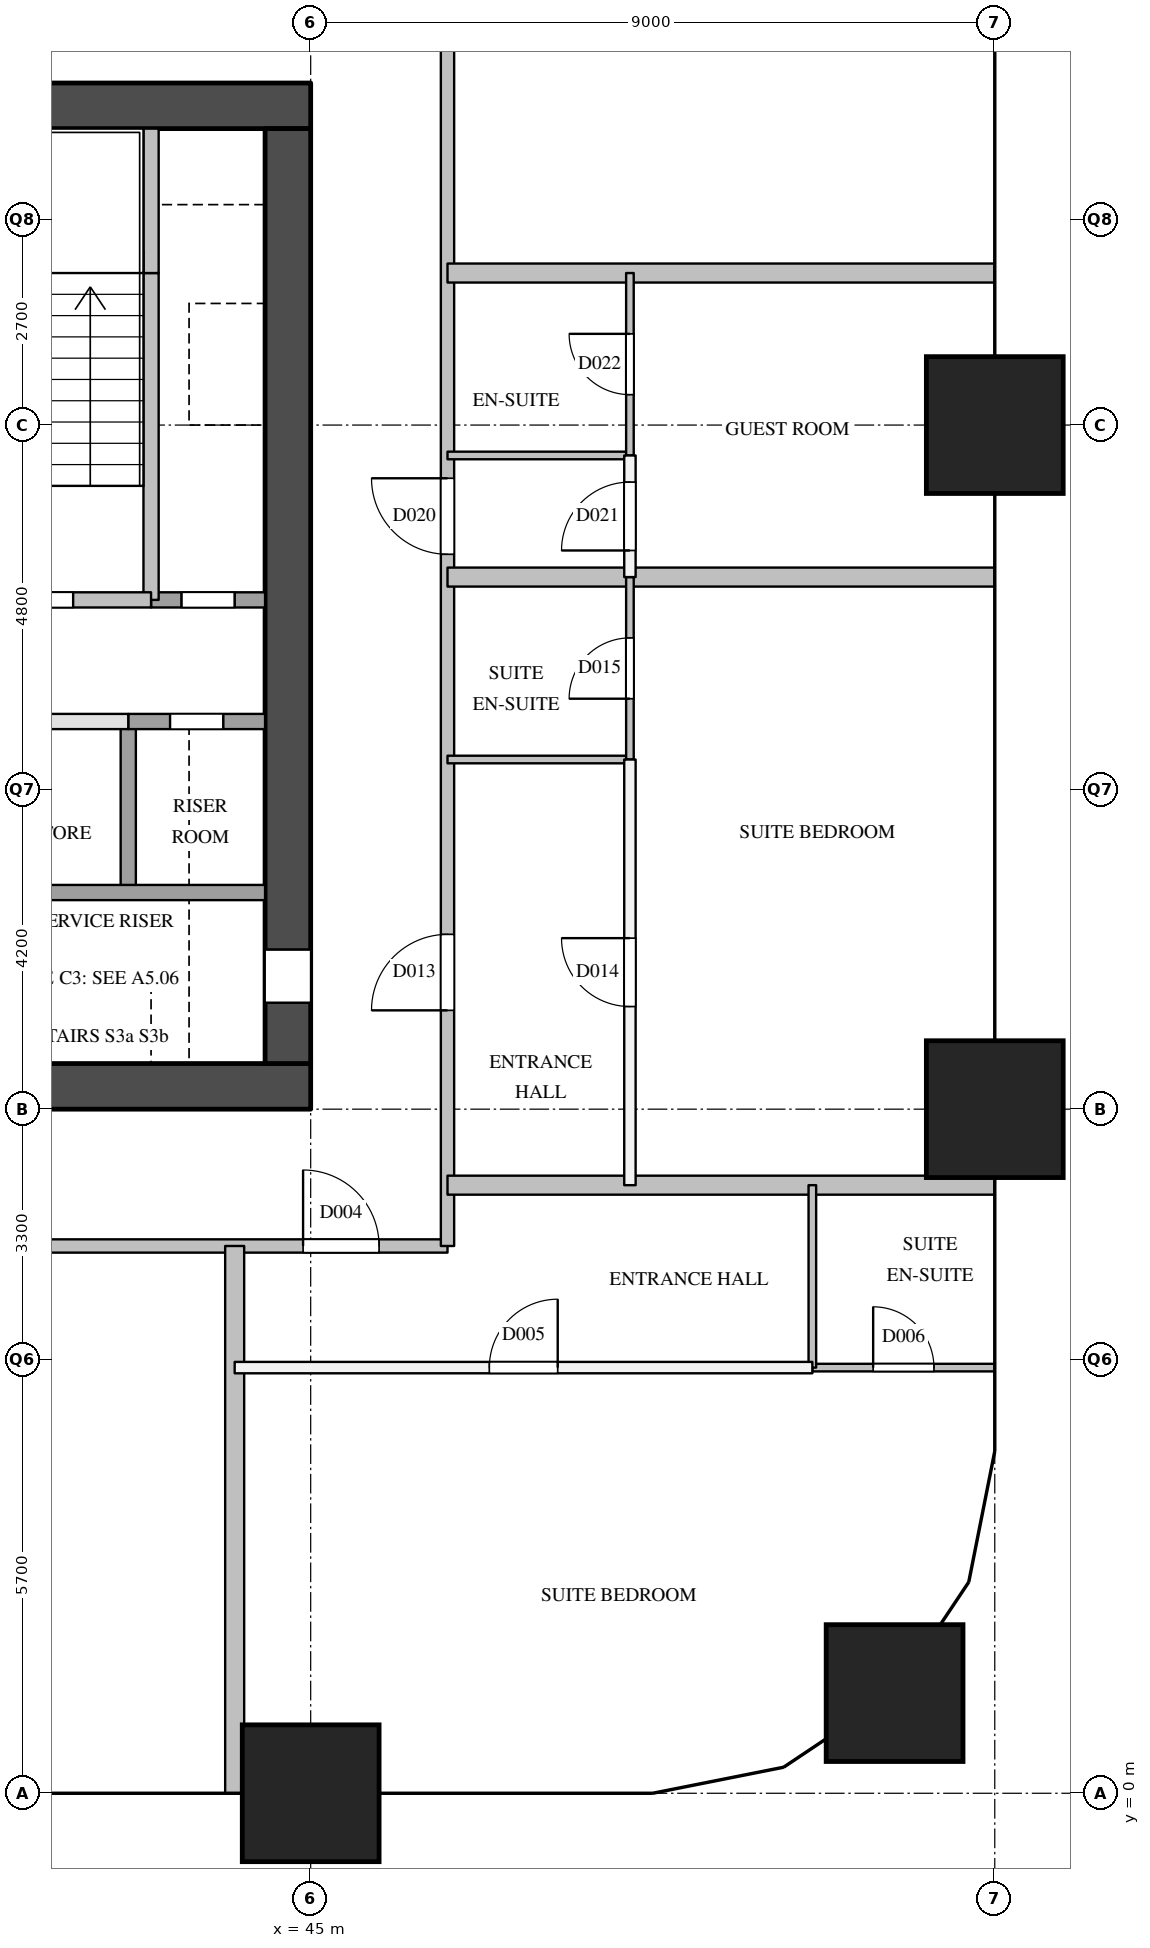
"""IFC4 building model, lengths in metres.
Left out: names, types, materials, properties, quantities, classifications, styles, units other than length and angle.
Written with IfcOpenShell. Run it as: python <this file> out.ifc"""

import sys

from ifc_helpers import new_model, si_unit, direction, frame, frame_2d, origin, origin_2d, place, context, subcontext, project, spatial, rectangle, extrude, element, fill, save


model = new_model("IFC4")
c1 = context("Model", 3, precision=1e-05, world=origin(), true_north=direction((0.0, 1.0)))
c2 = subcontext(c1, "Body", "Model", "MODEL_VIEW")
j1 = project(units=[si_unit("LENGTHUNIT", "METRE"), si_unit("PLANEANGLEUNIT", "RADIAN")], contexts=[c1])
p1 = place(None, origin())
s1 = spatial("IfcSite", under=j1, at=p1, CompositionType="ELEMENT")
p2 = place(p1, origin())
s2 = spatial("IfcBuilding", under=s1, at=p2, CompositionType="ELEMENT")
p3 = place(p2, frame((0.0, 0.0, 34.8)))
s3 = spatial("IfcBuildingStorey", under=s2, at=p3, CompositionType="ELEMENT", Elevation=34.8)
for number, where, z_axis, x_axis in (
    (1, (45.0, 0.0, 0.0), (0.0, 0.0, 1.0), (1.0, 0.0, 0.0)),
    (2, (52.682, 1.318, 0.0), (0.0, 0.0, 1.0), (1.0, 0.0, 0.0)),
    (3, (54.0, 9.0, 0.0), (0.0, 0.0, 1.0), (1.0, 0.0, 0.0)),
    (4, (54.0, 18.0, 0.0), (0.0, 0.0, 1.0), (1.0, 0.0, 0.0)),
):
    element("IfcColumn", number, at=place(p3, frame(where, z_axis=z_axis, x_axis=x_axis)), inside=s3, PredefinedType="COLUMN", context=c2, shape_type="SweptSolid", body=[
        extrude(rectangle(XDim=1.8, YDim=1.8, at=origin_2d()), origin(), (0.0, 0.0, 1.0), 3.8),
    ])
for number, where, z_axis, x_axis in (
    (5, (36.0, 9.3, 0.0), (0.0, 0.0, 1.0), (1.0, 0.0, 0.0)),
    (6, (36.0, 22.2, 0.0), (0.0, 0.0, 1.0), (1.0, 0.0, 0.0)),
):
    element("IfcWall", number, at=place(p3, frame(where, z_axis=z_axis, x_axis=x_axis)), inside=s3, PredefinedType="SHEAR", context=c2, shape_type="SweptSolid", body=[
        extrude(rectangle(XDim=9.0, YDim=0.6, at=frame_2d((4.5, 0.0))), origin(), (0.0, 0.0, 1.0), 3.5),
    ])
p4 = place(p3, frame((44.7, 9.6, 0.0), z_axis=(0.0, 0.0, 1.0), x_axis=(0.0, 1.0, 0.0)))
e7 = element("IfcWall", 7, at=p4, inside=s3, PredefinedType="SHEAR", context=c2, shape_type="SweptSolid", body=[
    extrude(rectangle(XDim=12.3, YDim=0.6, at=frame_2d((6.15, 0.0))), origin(), (0.0, 0.0, 1.0), 3.5),
])
p5 = place(p4, frame((0.8, 0.0, 0.0)))
e8 = element("IfcOpeningElement", 8, at=p5, cuts=e7, PredefinedType="OPENING", context=c2, shape_type="SweptSolid", body=[
    extrude(rectangle(XDim=0.7, YDim=2.1, at=frame_2d((0.35, 1.05))), frame((0.0, 0.31, 0.0), z_axis=(0.0, -1.0, 0.0), x_axis=(1.0, 0.0, 0.0)), (0.0, 0.0, 1.0), 0.62),
])
p6 = place(p3, frame((42.6, 11.9, 0.0), z_axis=(0.0, 0.0, 1.0), x_axis=(0.0, 1.0, 0.0)))
e9 = element("IfcWall", 9, at=p6, inside=s3, PredefinedType="SOLIDWALL", context=c2, shape_type="SweptSolid", body=[
    extrude(rectangle(XDim=2.2, YDim=0.2, at=frame_2d((1.1, 0.0))), origin(), (0.0, 0.0, 1.0), 3.5),
])
p7 = place(p3, frame((42.9, 15.7, 0.0), z_axis=(0.0, 0.0, 1.0), x_axis=(0.0, 1.0, 0.0)))
e10 = element("IfcWall", 10, at=p7, inside=s3, PredefinedType="SOLIDWALL", context=c2, shape_type="SweptSolid", body=[
    extrude(rectangle(XDim=4.3, YDim=0.2, at=frame_2d((2.15, 0.0))), origin(), (0.0, 0.0, 1.0), 3.5),
])
p8 = place(p3, frame((42.9, 20.0, 0.0), z_axis=(0.0, 0.0, 1.0), x_axis=(0.0, 1.0, 0.0)))
e11 = element("IfcWall", 11, at=p8, inside=s3, PredefinedType="SOLIDWALL", context=c2, shape_type="SweptSolid", body=[
    extrude(rectangle(XDim=1.9, YDim=0.2, at=frame_2d((0.95, 0.0))), origin(), (0.0, 0.0, 1.0), 3.5),
])
p9 = place(p3, frame((36.6, 11.85, 0.0), z_axis=(0.0, 0.0, 1.0), x_axis=(1.0, 0.0, 0.0)))
e12 = element("IfcWall", 12, at=p9, inside=s3, PredefinedType="SOLIDWALL", context=c2, shape_type="SweptSolid", body=[
    extrude(rectangle(XDim=7.8, YDim=0.2, at=frame_2d((3.9, 0.0))), origin(), (0.0, 0.0, 1.0), 3.5),
])
p10 = place(p3, frame((36.6, 14.1, 0.0), z_axis=(0.0, 0.0, 1.0), x_axis=(1.0, 0.0, 0.0)))
e13 = element("IfcWall", 13, at=p10, inside=s3, PredefinedType="PARTITIONING", context=c2, shape_type="SweptSolid", body=[
    extrude(rectangle(XDim=6.0, YDim=0.2, at=frame_2d((3.0, 0.0))), origin(), (0.0, 0.0, 1.0), 3.5),
])
p11 = place(p10, frame((0.9, 0.0, 0.0)))
e14 = element("IfcOpeningElement", 14, at=p11, cuts=e13, PredefinedType="OPENING", context=c2, shape_type="SweptSolid", body=[
    extrude(rectangle(XDim=0.9, YDim=2.1, at=frame_2d((0.45, 1.05))), frame((0.0, 0.11, 0.0), z_axis=(0.0, -1.0, 0.0), x_axis=(1.0, 0.0, 0.0)), (0.0, 0.0, 1.0), 0.22),
])
p12 = place(p10, frame((3.9, 0.0, 0.0)))
e15 = element("IfcOpeningElement", 15, at=p12, cuts=e13, PredefinedType="OPENING", context=c2, shape_type="SweptSolid", body=[
    extrude(rectangle(XDim=0.9, YDim=2.1, at=frame_2d((0.45, 1.05))), frame((0.0, 0.11, 0.0), z_axis=(0.0, -1.0, 0.0), x_axis=(1.0, 0.0, 0.0)), (0.0, 0.0, 1.0), 0.22),
])
p13 = place(p3, frame((42.6, 14.1, 0.0), z_axis=(0.0, 0.0, 1.0), x_axis=(1.0, 0.0, 0.0)))
e16 = element("IfcWall", 16, at=p13, inside=s3, PredefinedType="SOLIDWALL", context=c2, shape_type="SweptSolid", body=[
    extrude(rectangle(XDim=1.8, YDim=0.2, at=frame_2d((0.9, 0.0))), origin(), (0.0, 0.0, 1.0), 3.5),
])
p14 = place(p13, frame((0.55, 0.0, 0.0)))
e17 = element("IfcOpeningElement", 17, at=p14, cuts=e16, PredefinedType="OPENING", context=c2, shape_type="SweptSolid", body=[
    extrude(rectangle(XDim=0.7, YDim=2.1, at=frame_2d((0.35, 1.05))), frame((0.0, 0.11, 0.0), z_axis=(0.0, -1.0, 0.0), x_axis=(1.0, 0.0, 0.0)), (0.0, 0.0, 1.0), 0.22),
])
p15 = place(p3, frame((42.9, 15.7, 0.0), z_axis=(0.0, 0.0, 1.0), x_axis=(1.0, 0.0, 0.0)))
e18 = element("IfcWall", 18, at=p15, inside=s3, PredefinedType="SOLIDWALL", context=c2, shape_type="SweptSolid", body=[
    extrude(rectangle(XDim=1.5, YDim=0.2, at=frame_2d((0.75, 0.0))), origin(), (0.0, 0.0, 1.0), 3.5),
])
p16 = place(p15, frame((0.4, 0.0, 0.0)))
e19 = element("IfcOpeningElement", 19, at=p16, cuts=e18, PredefinedType="OPENING", context=c2, shape_type="SweptSolid", body=[
    extrude(rectangle(XDim=0.7, YDim=2.1, at=frame_2d((0.35, 1.05))), frame((0.0, 0.11, 0.0), z_axis=(0.0, -1.0, 0.0), x_axis=(1.0, 0.0, 0.0)), (0.0, 0.0, 1.0), 0.22),
])
p17 = place(p3, frame((36.6, 15.7, 0.0), z_axis=(0.0, 0.0, 1.0), x_axis=(1.0, 0.0, 0.0)))
e20 = element("IfcWall", 20, at=p17, inside=s3, PredefinedType="SOLIDWALL", context=c2, shape_type="SweptSolid", body=[
    extrude(rectangle(XDim=6.3, YDim=0.2, at=frame_2d((3.15, 0.0))), origin(), (0.0, 0.0, 1.0), 3.5),
])
p18 = place(p17, frame((1.025, 0.0, 0.0)))
e21 = element("IfcOpeningElement", 21, at=p18, cuts=e20, PredefinedType="OPENING", context=c2, shape_type="SweptSolid", body=[
    extrude(rectangle(XDim=1.1, YDim=2.1, at=frame_2d((0.55, 1.05))), frame((0.0, 0.11, 0.0), z_axis=(0.0, -1.0, 0.0), x_axis=(1.0, 0.0, 0.0)), (0.0, 0.0, 1.0), 0.22),
])
p19 = place(p17, frame((4.175, 0.0, 0.0)))
e22 = element("IfcOpeningElement", 22, at=p19, cuts=e20, PredefinedType="OPENING", context=c2, shape_type="SweptSolid", body=[
    extrude(rectangle(XDim=1.1, YDim=2.1, at=frame_2d((0.55, 1.05))), frame((0.0, 0.11, 0.0), z_axis=(0.0, -1.0, 0.0), x_axis=(1.0, 0.0, 0.0)), (0.0, 0.0, 1.0), 0.22),
])
p20 = place(p3, frame((34.2, 7.2, 0.0), z_axis=(0.0, 0.0, 1.0), x_axis=(1.0, 0.0, 0.0)))
e23 = element("IfcWall", 23, at=p20, inside=s3, PredefinedType="PARTITIONING", context=c2, shape_type="SweptSolid", body=[
    extrude(rectangle(XDim=12.6, YDim=0.175, at=frame_2d((6.3, 0.0))), origin(), (0.0, 0.0, 1.0), 3.5),
])
p21 = place(p20, frame((10.7, 0.0, 0.0)))
e24 = element("IfcOpeningElement", 24, at=p21, cuts=e23, PredefinedType="OPENING", context=c2, shape_type="SweptSolid", body=[
    extrude(rectangle(XDim=1.0, YDim=2.1, at=frame_2d((0.5, 1.05))), frame((0.0, 0.097, 0.0), z_axis=(0.0, -1.0, 0.0), x_axis=(1.0, 0.0, 0.0)), (0.0, 0.0, 1.0), 0.195),
])
p22 = place(p3, frame((46.8, 7.2, 0.0), z_axis=(0.0, 0.0, 1.0), x_axis=(0.0, 1.0, 0.0)))
e25 = element("IfcWall", 25, at=p22, inside=s3, PredefinedType="PARTITIONING", context=c2, shape_type="SweptSolid", body=[
    extrude(rectangle(XDim=16.49, YDim=0.175, at=frame_2d((8.245, 0.0))), origin(), (0.0, 0.0, 1.0), 3.5),
])
p23 = place(p22, frame((3.1, 0.0, 0.0)))
e26 = element("IfcOpeningElement", 26, at=p23, cuts=e25, PredefinedType="OPENING", context=c2, shape_type="SweptSolid", body=[
    extrude(rectangle(XDim=1.0, YDim=2.1, at=frame_2d((0.5, 1.05))), frame((0.0, 0.097, 0.0), z_axis=(0.0, -1.0, 0.0), x_axis=(1.0, 0.0, 0.0)), (0.0, 0.0, 1.0), 0.195),
])
p24 = place(p22, frame((9.1, 0.0, 0.0)))
e27 = element("IfcOpeningElement", 27, at=p24, cuts=e25, PredefinedType="OPENING", context=c2, shape_type="SweptSolid", body=[
    extrude(rectangle(XDim=1.0, YDim=2.1, at=frame_2d((0.5, 1.05))), frame((0.0, 0.097, 0.0), z_axis=(0.0, -1.0, 0.0), x_axis=(1.0, 0.0, 0.0)), (0.0, 0.0, 1.0), 0.195),
])
p25 = place(p3, frame((44.0, 5.6, 0.0), z_axis=(0.0, 0.0, 1.0), x_axis=(1.0, 0.0, 0.0)))
e28 = element("IfcWall", 28, at=p25, inside=s3, PredefinedType="PARTITIONING", context=c2, shape_type="SweptSolid", body=[
    extrude(rectangle(XDim=7.6, YDim=0.15, at=frame_2d((3.8, 0.0))), origin(), (0.0, 0.0, 1.0), 3.5),
])
p26 = place(p25, frame((3.35, 0.0, 0.0)))
e29 = element("IfcOpeningElement", 29, at=p26, cuts=e28, PredefinedType="OPENING", context=c2, shape_type="SweptSolid", body=[
    extrude(rectangle(XDim=0.9, YDim=2.1, at=frame_2d((0.45, 1.05))), frame((0.0, 0.085, 0.0), z_axis=(0.0, -1.0, 0.0), x_axis=(1.0, 0.0, 0.0)), (0.0, 0.0, 1.0), 0.17),
])
p27 = place(p3, frame((49.2, 8.0, 0.0), z_axis=(0.0, 0.0, 1.0), x_axis=(0.0, 1.0, 0.0)))
e30 = element("IfcWall", 30, at=p27, inside=s3, PredefinedType="PARTITIONING", context=c2, shape_type="SweptSolid", body=[
    extrude(rectangle(XDim=5.6, YDim=0.15, at=frame_2d((2.8, 0.0))), origin(), (0.0, 0.0, 1.0), 3.5),
])
p28 = place(p27, frame((2.35, 0.0, 0.0)))
e31 = element("IfcOpeningElement", 31, at=p28, cuts=e30, PredefinedType="OPENING", context=c2, shape_type="SweptSolid", body=[
    extrude(rectangle(XDim=0.9, YDim=2.1, at=frame_2d((0.45, 1.05))), frame((0.0, 0.085, 0.0), z_axis=(0.0, -1.0, 0.0), x_axis=(1.0, 0.0, 0.0)), (0.0, 0.0, 1.0), 0.17),
])
p29 = place(p3, frame((49.2, 16.0, 0.0), z_axis=(0.0, 0.0, 1.0), x_axis=(0.0, 1.0, 0.0)))
e32 = element("IfcWall", 32, at=p29, inside=s3, PredefinedType="PARTITIONING", context=c2, shape_type="SweptSolid", body=[
    extrude(rectangle(XDim=1.6, YDim=0.15, at=frame_2d((0.8, 0.0))), origin(), (0.0, 0.0, 1.0), 3.5),
])
p30 = place(p29, frame((0.35, 0.0, 0.0)))
e33 = element("IfcOpeningElement", 33, at=p30, cuts=e32, PredefinedType="OPENING", context=c2, shape_type="SweptSolid", body=[
    extrude(rectangle(XDim=0.9, YDim=2.1, at=frame_2d((0.45, 1.05))), frame((0.0, 0.085, 0.0), z_axis=(0.0, -1.0, 0.0), x_axis=(1.0, 0.0, 0.0)), (0.0, 0.0, 1.0), 0.17),
])
for number, where, z_axis, x_axis in (
    (34, (46.8, 8.0, 0.0), (0.0, 0.0, 1.0), (1.0, 0.0, 0.0)),
    (35, (46.8, 16.0, 0.0), (0.0, 0.0, 1.0), (1.0, 0.0, 0.0)),
    (36, (46.8, 20.0, 0.0), (0.0, 0.0, 1.0), (1.0, 0.0, 0.0)),
    (37, (44.0, 0.0, 0.0), (0.0, 0.0, 1.0), (0.0, 1.0, 0.0)),
):
    element("IfcWall", number, at=place(p3, frame(where, z_axis=z_axis, x_axis=x_axis)), inside=s3, PredefinedType="PARTITIONING", context=c2, shape_type="SweptSolid", body=[
        extrude(rectangle(XDim=7.2, YDim=0.25, at=frame_2d((3.6, 0.0))), origin(), (0.0, 0.0, 1.0), 2.5),
    ])
p31 = place(p3, frame((51.6, 5.6, 0.0), z_axis=(0.0, 0.0, 1.0), x_axis=(1.0, 0.0, 0.0)))
e38 = element("IfcWall", 38, at=p31, inside=s3, PredefinedType="PARTITIONING", context=c2, shape_type="SweptSolid", body=[
    extrude(rectangle(XDim=2.4, YDim=0.1, at=frame_2d((1.2, 0.0))), origin(), (0.0, 0.0, 1.0), 2.5),
])
p32 = place(p31, frame((0.8, 0.0, 0.0)))
e39 = element("IfcOpeningElement", 39, at=p32, cuts=e38, PredefinedType="OPENING", context=c2, shape_type="SweptSolid", body=[
    extrude(rectangle(XDim=0.8, YDim=2.1, at=frame_2d((0.4, 1.05))), frame((0.0, 0.06, 0.0), z_axis=(0.0, -1.0, 0.0), x_axis=(1.0, 0.0, 0.0)), (0.0, 0.0, 1.0), 0.12),
])
for number, where, z_axis, x_axis in (
    (40, (46.8, 13.6, 0.0), (0.0, 0.0, 1.0), (1.0, 0.0, 0.0)),
    (41, (46.8, 17.6, 0.0), (0.0, 0.0, 1.0), (1.0, 0.0, 0.0)),
):
    element("IfcWall", number, at=place(p3, frame(where, z_axis=z_axis, x_axis=x_axis)), inside=s3, PredefinedType="PARTITIONING", context=c2, shape_type="SweptSolid", body=[
        extrude(rectangle(XDim=2.4, YDim=0.1, at=frame_2d((1.2, 0.0))), origin(), (0.0, 0.0, 1.0), 3.5),
    ])
p33 = place(p3, frame((49.2, 13.6, 0.0), z_axis=(0.0, 0.0, 1.0), x_axis=(0.0, 1.0, 0.0)))
e42 = element("IfcWall", 42, at=p33, inside=s3, PredefinedType="PARTITIONING", context=c2, shape_type="SweptSolid", body=[
    extrude(rectangle(XDim=2.4, YDim=0.1, at=frame_2d((1.2, 0.0))), origin(), (0.0, 0.0, 1.0), 3.5),
])
p34 = place(p33, frame((0.8, 0.0, 0.0)))
e43 = element("IfcOpeningElement", 43, at=p34, cuts=e42, PredefinedType="OPENING", context=c2, shape_type="SweptSolid", body=[
    extrude(rectangle(XDim=0.8, YDim=2.1, at=frame_2d((0.4, 1.05))), frame((0.0, 0.06, 0.0), z_axis=(0.0, -1.0, 0.0), x_axis=(1.0, 0.0, 0.0)), (0.0, 0.0, 1.0), 0.12),
])
p35 = place(p3, frame((49.2, 17.6, 0.0), z_axis=(0.0, 0.0, 1.0), x_axis=(0.0, 1.0, 0.0)))
e44 = element("IfcWall", 44, at=p35, inside=s3, PredefinedType="PARTITIONING", context=c2, shape_type="SweptSolid", body=[
    extrude(rectangle(XDim=2.4, YDim=0.1, at=frame_2d((1.2, 0.0))), origin(), (0.0, 0.0, 1.0), 3.5),
])
p36 = place(p35, frame((0.8, 0.0, 0.0)))
e45 = element("IfcOpeningElement", 45, at=p36, cuts=e44, PredefinedType="OPENING", context=c2, shape_type="SweptSolid", body=[
    extrude(rectangle(XDim=0.8, YDim=2.1, at=frame_2d((0.4, 1.05))), frame((0.0, 0.06, 0.0), z_axis=(0.0, -1.0, 0.0), x_axis=(1.0, 0.0, 0.0)), (0.0, 0.0, 1.0), 0.12),
])
p37 = place(p3, frame((51.6, 5.6, 0.0), z_axis=(0.0, 0.0, 1.0), x_axis=(0.0, 1.0, 0.0)))
e46 = element("IfcWall", 46, at=p37, inside=s3, PredefinedType="PARTITIONING", context=c2, shape_type="SweptSolid", body=[
    extrude(rectangle(XDim=2.4, YDim=0.1, at=frame_2d((1.2, 0.0))), origin(), (0.0, 0.0, 1.0), 3.5),
])
p38 = place(p19, origin())
e47 = element("IfcDoor", 47, at=p38, inside=s3, OperationType="SINGLE_SWING_RIGHT", PredefinedType="DOOR", context=c2, shape_type="SweptSolid", body=[
    extrude(rectangle(XDim=1.1, YDim=2.1, at=frame_2d((0.55, 1.05))), frame((0.0, 0.025, 0.0), z_axis=(0.0, -1.0, 0.0), x_axis=(1.0, 0.0, 0.0)), (0.0, 0.0, 1.0), 0.05),
])
fill(e22, e47)
p39 = place(p16, origin())
e48 = element("IfcDoor", 48, at=p39, inside=s3, OperationType="SINGLE_SWING_LEFT", PredefinedType="DOOR", context=c2, shape_type="SweptSolid", body=[
    extrude(rectangle(XDim=0.7, YDim=2.1, at=frame_2d((0.35, 1.05))), frame((0.0, 0.025, 0.0), z_axis=(0.0, -1.0, 0.0), x_axis=(1.0, 0.0, 0.0)), (0.0, 0.0, 1.0), 0.05),
])
fill(e19, e48)
p40 = place(p14, origin())
e49 = element("IfcDoor", 49, at=p40, inside=s3, OperationType="SINGLE_SWING_RIGHT", PredefinedType="DOOR", context=c2, shape_type="SweptSolid", body=[
    extrude(rectangle(XDim=0.7, YDim=2.1, at=frame_2d((0.35, 1.05))), frame((0.0, 0.025, 0.0), z_axis=(0.0, -1.0, 0.0), x_axis=(1.0, 0.0, 0.0)), (0.0, 0.0, 1.0), 0.05),
])
fill(e17, e49)
p41 = place(p5, origin())
e50 = element("IfcDoor", 50, at=p41, inside=s3, OperationType="SINGLE_SWING_LEFT", PredefinedType="DOOR", context=c2, shape_type="SweptSolid", body=[
    extrude(rectangle(XDim=0.7, YDim=2.1, at=frame_2d((0.35, 1.05))), frame((0.0, 0.025, 0.0), z_axis=(0.0, -1.0, 0.0), x_axis=(1.0, 0.0, 0.0)), (0.0, 0.0, 1.0), 0.05),
])
fill(e8, e50)
p42 = place(p21, origin())
e51 = element("IfcDoor", 51, at=p42, inside=s3, OperationType="SINGLE_SWING_LEFT", PredefinedType="DOOR", context=c2, shape_type="SweptSolid", body=[
    extrude(rectangle(XDim=1.0, YDim=2.1, at=frame_2d((0.5, 1.05))), frame((0.0, 0.025, 0.0), z_axis=(0.0, -1.0, 0.0), x_axis=(1.0, 0.0, 0.0)), (0.0, 0.0, 1.0), 0.05),
])
fill(e24, e51)
p43 = place(p26, origin())
e52 = element("IfcDoor", 52, at=p43, inside=s3, OperationType="SINGLE_SWING_RIGHT", PredefinedType="DOOR", context=c2, shape_type="SweptSolid", body=[
    extrude(rectangle(XDim=0.9, YDim=2.1, at=frame_2d((0.45, 1.05))), frame((0.0, 0.025, 0.0), z_axis=(0.0, -1.0, 0.0), x_axis=(1.0, 0.0, 0.0)), (0.0, 0.0, 1.0), 0.05),
])
fill(e29, e52)
p44 = place(p32, origin())
e53 = element("IfcDoor", 53, at=p44, inside=s3, OperationType="SINGLE_SWING_LEFT", PredefinedType="DOOR", context=c2, shape_type="SweptSolid", body=[
    extrude(rectangle(XDim=0.8, YDim=2.1, at=frame_2d((0.4, 1.05))), frame((0.0, 0.025, 0.0), z_axis=(0.0, -1.0, 0.0), x_axis=(1.0, 0.0, 0.0)), (0.0, 0.0, 1.0), 0.05),
])
fill(e39, e53)
p45 = place(p23, origin())
e54 = element("IfcDoor", 54, at=p45, inside=s3, OperationType="SINGLE_SWING_LEFT", PredefinedType="DOOR", context=c2, shape_type="SweptSolid", body=[
    extrude(rectangle(XDim=1.0, YDim=2.1, at=frame_2d((0.5, 1.05))), frame((0.0, 0.025, 0.0), z_axis=(0.0, -1.0, 0.0), x_axis=(1.0, 0.0, 0.0)), (0.0, 0.0, 1.0), 0.05),
])
fill(e26, e54)
p46 = place(p28, origin())
e55 = element("IfcDoor", 55, at=p46, inside=s3, OperationType="SINGLE_SWING_RIGHT", PredefinedType="DOOR", context=c2, shape_type="SweptSolid", body=[
    extrude(rectangle(XDim=0.9, YDim=2.1, at=frame_2d((0.45, 1.05))), frame((0.0, 0.025, 0.0), z_axis=(0.0, -1.0, 0.0), x_axis=(1.0, 0.0, 0.0)), (0.0, 0.0, 1.0), 0.05),
])
fill(e31, e55)
p47 = place(p34, origin())
e56 = element("IfcDoor", 56, at=p47, inside=s3, OperationType="SINGLE_SWING_LEFT", PredefinedType="DOOR", context=c2, shape_type="SweptSolid", body=[
    extrude(rectangle(XDim=0.8, YDim=2.1, at=frame_2d((0.4, 1.05))), frame((0.0, 0.025, 0.0), z_axis=(0.0, -1.0, 0.0), x_axis=(1.0, 0.0, 0.0)), (0.0, 0.0, 1.0), 0.05),
])
fill(e43, e56)
p48 = place(p24, origin())
e57 = element("IfcDoor", 57, at=p48, inside=s3, OperationType="SINGLE_SWING_RIGHT", PredefinedType="DOOR", context=c2, shape_type="SweptSolid", body=[
    extrude(rectangle(XDim=1.0, YDim=2.1, at=frame_2d((0.5, 1.05))), frame((0.0, 0.025, 0.0), z_axis=(0.0, -1.0, 0.0), x_axis=(1.0, 0.0, 0.0)), (0.0, 0.0, 1.0), 0.05),
])
fill(e27, e57)
p49 = place(p30, origin())
e58 = element("IfcDoor", 58, at=p49, inside=s3, OperationType="SINGLE_SWING_LEFT", PredefinedType="DOOR", context=c2, shape_type="SweptSolid", body=[
    extrude(rectangle(XDim=0.9, YDim=2.1, at=frame_2d((0.45, 1.05))), frame((0.0, 0.025, 0.0), z_axis=(0.0, -1.0, 0.0), x_axis=(1.0, 0.0, 0.0)), (0.0, 0.0, 1.0), 0.05),
])
fill(e33, e58)
p50 = place(p36, origin())
e59 = element("IfcDoor", 59, at=p50, inside=s3, OperationType="SINGLE_SWING_RIGHT", PredefinedType="DOOR", context=c2, shape_type="SweptSolid", body=[
    extrude(rectangle(XDim=0.8, YDim=2.1, at=frame_2d((0.4, 1.05))), frame((0.0, 0.025, 0.0), z_axis=(0.0, -1.0, 0.0), x_axis=(1.0, 0.0, 0.0)), (0.0, 0.0, 1.0), 0.05),
])
fill(e45, e59)
save(model, sys.argv[1])
